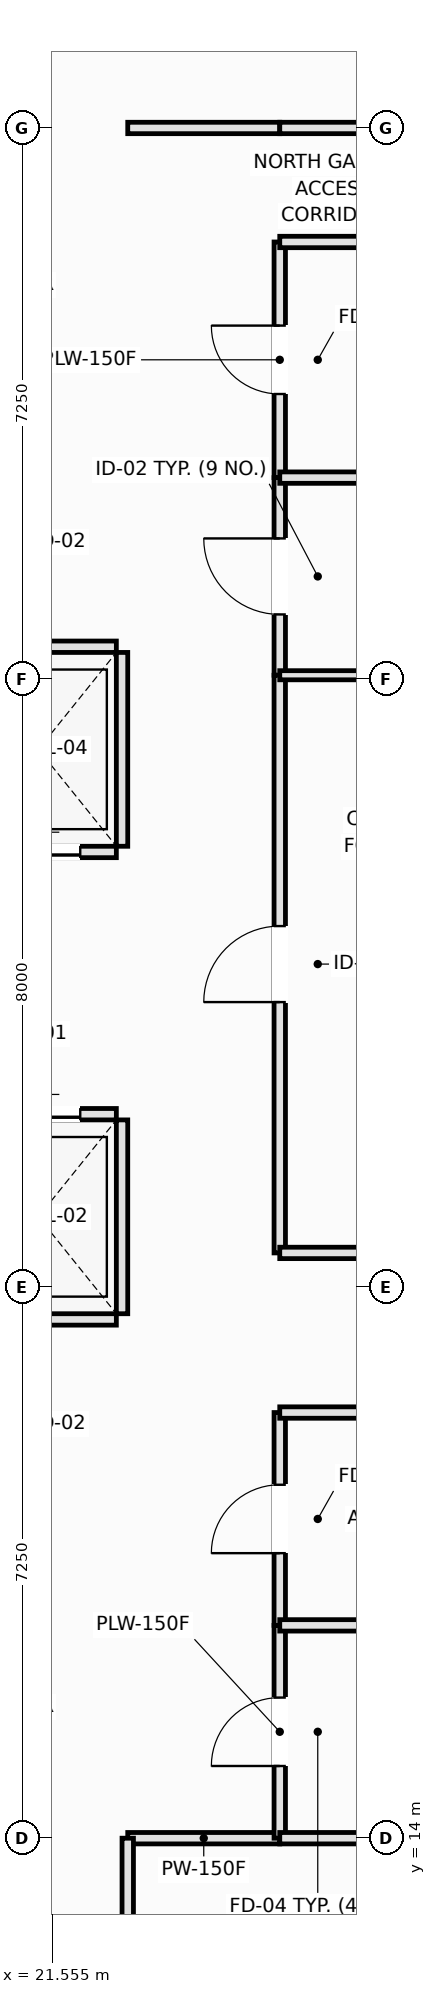
"""IFC4 building model, lengths in metres.
Left out: names, types, materials, properties, quantities, classifications, styles, units other than length and angle.
Written with IfcOpenShell. Run it as: python <this file> out.ifc"""

import sys

from ifc_helpers import new_model, si_unit, direction, frame, frame_2d, origin, place, context, subcontext, project, spatial, rectangle, extrude, element, fill, save


model = new_model("IFC4")
c1 = context("Model", 3, precision=1e-05, world=origin(), true_north=direction((0.0, 1.0)))
c2 = subcontext(c1, "Body", "Model", "MODEL_VIEW")
j1 = project(units=[si_unit("LENGTHUNIT", "METRE"), si_unit("PLANEANGLEUNIT", "RADIAN")], contexts=[c1])
p1 = place(None, origin())
s1 = spatial("IfcSite", under=j1, at=p1, CompositionType="ELEMENT")
p2 = place(p1, origin())
s2 = spatial("IfcBuilding", under=s1, at=p2, CompositionType="ELEMENT")
p3 = place(p2, frame((0.0, 0.0, 10.8)))
s3 = spatial("IfcBuildingStorey", under=s2, at=p3, CompositionType="ELEMENT", Elevation=10.8)
p4 = place(p3, frame((20.35, 20.825, 0.0), z_axis=(0.0, 0.0, 1.0), x_axis=(1.0, 0.0, 0.0)))
e1 = element("IfcWall", 1, at=p4, inside=s3, PredefinedType="PARTITIONING", context=c2, shape_type="SweptSolid", body=[
    extrude(rectangle(XDim=2.05, YDim=0.15, at=frame_2d((1.025, 0.0))), origin(), (0.0, 0.0, 1.0), 4.6),
])
p5 = place(p3, frame((20.35, 23.525, 0.0), z_axis=(0.0, 0.0, 1.0), x_axis=(1.0, 0.0, 0.0)))
e2 = element("IfcWall", 2, at=p5, inside=s3, PredefinedType="PARTITIONING", context=c2, shape_type="SweptSolid", body=[
    extrude(rectangle(XDim=2.05, YDim=0.15, at=frame_2d((1.025, 0.0))), origin(), (0.0, 0.0, 1.0), 4.6),
])
p6 = place(p5, frame((0.475, 0.0, 0.0)))
e3 = element("IfcOpeningElement", 3, at=p6, cuts=e2, PredefinedType="OPENING", context=c2, shape_type="SweptSolid", body=[
    extrude(rectangle(XDim=1.1, YDim=2.2, at=frame_2d((0.55, 1.1))), frame((0.0, 0.085, 0.0), z_axis=(0.0, -1.0, 0.0), x_axis=(1.0, 0.0, 0.0)), (0.0, 0.0, 1.0), 0.17),
])
p7 = place(p3, frame((22.475, 20.9, 0.0), z_axis=(0.0, 0.0, 1.0), x_axis=(0.0, 1.0, 0.0)))
e4 = element("IfcWall", 4, at=p7, inside=s3, PredefinedType="PARTITIONING", context=c2, shape_type="SweptSolid", body=[
    extrude(rectangle(XDim=2.55, YDim=0.15, at=frame_2d((1.275, 0.0))), origin(), (0.0, 0.0, 1.0), 4.6),
])
p8 = place(p3, frame((20.35, 26.975, 0.0), z_axis=(0.0, 0.0, 1.0), x_axis=(1.0, 0.0, 0.0)))
e5 = element("IfcWall", 5, at=p8, inside=s3, PredefinedType="PARTITIONING", context=c2, shape_type="SweptSolid", body=[
    extrude(rectangle(XDim=2.05, YDim=0.15, at=frame_2d((1.025, 0.0))), origin(), (0.0, 0.0, 1.0), 4.6),
])
p9 = place(p8, frame((0.475, 0.0, 0.0)))
e6 = element("IfcOpeningElement", 6, at=p9, cuts=e5, PredefinedType="OPENING", context=c2, shape_type="SweptSolid", body=[
    extrude(rectangle(XDim=1.1, YDim=2.2, at=frame_2d((0.55, 1.1))), frame((0.0, 0.085, 0.0), z_axis=(0.0, -1.0, 0.0), x_axis=(1.0, 0.0, 0.0)), (0.0, 0.0, 1.0), 0.17),
])
p10 = place(p3, frame((20.35, 29.675, 0.0), z_axis=(0.0, 0.0, 1.0), x_axis=(1.0, 0.0, 0.0)))
e7 = element("IfcWall", 7, at=p10, inside=s3, PredefinedType="PARTITIONING", context=c2, shape_type="SweptSolid", body=[
    extrude(rectangle(XDim=2.05, YDim=0.15, at=frame_2d((1.025, 0.0))), origin(), (0.0, 0.0, 1.0), 4.6),
])
p11 = place(p3, frame((22.475, 27.05, 0.0), z_axis=(0.0, 0.0, 1.0), x_axis=(0.0, 1.0, 0.0)))
e8 = element("IfcWall", 8, at=p11, inside=s3, PredefinedType="PARTITIONING", context=c2, shape_type="SweptSolid", body=[
    extrude(rectangle(XDim=2.55, YDim=0.15, at=frame_2d((1.275, 0.0))), origin(), (0.0, 0.0, 1.0), 4.6),
])
for number, where, z_axis, x_axis in (
    (9, (22.55, 14.0, 0.0), (0.0, 0.0, 1.0), (1.0, 0.0, 0.0)),
    (10, (22.55, 36.5, 0.0), (0.0, 0.0, 1.0), (1.0, 0.0, 0.0)),
):
    element("IfcWall", number, at=place(p3, frame(where, z_axis=z_axis, x_axis=x_axis)), inside=s3, PredefinedType="PARTITIONING", context=c2, shape_type="SweptSolid", body=[
        extrude(rectangle(XDim=2.0, YDim=0.15, at=frame_2d((1.0, 0.0))), origin(), (0.0, 0.0, 1.0), 4.6),
    ])
p12 = place(p3, frame((24.55, 14.0, 0.0), z_axis=(0.0, 0.0, 1.0), x_axis=(0.0, 1.0, 0.0)))
e11 = element("IfcWall", 11, at=p12, inside=s3, PredefinedType="PLUMBINGWALL", context=c2, shape_type="SweptSolid", body=[
    extrude(rectangle(XDim=2.8, YDim=0.15, at=frame_2d((1.4, 0.0))), origin(), (0.0, 0.0, 1.0), 4.6),
])
p13 = place(p12, frame((0.95, 0.0, 0.0)))
e12 = element("IfcOpeningElement", 12, at=p13, cuts=e11, PredefinedType="OPENING", context=c2, shape_type="SweptSolid", body=[
    extrude(rectangle(XDim=0.9, YDim=2.1, at=frame_2d((0.45, 1.05))), frame((0.0, 0.085, 0.0), z_axis=(0.0, -1.0, 0.0), x_axis=(1.0, 0.0, 0.0)), (0.0, 0.0, 1.0), 0.17),
])
p14 = place(p3, frame((24.55, 31.9, 0.0), z_axis=(0.0, 0.0, 1.0), x_axis=(0.0, 1.0, 0.0)))
e13 = element("IfcWall", 13, at=p14, inside=s3, PredefinedType="PLUMBINGWALL", context=c2, shape_type="SweptSolid", body=[
    extrude(rectangle(XDim=3.1, YDim=0.15, at=frame_2d((1.55, 0.0))), origin(), (0.0, 0.0, 1.0), 4.6),
])
p15 = place(p14, frame((1.1, 0.0, 0.0)))
e14 = element("IfcOpeningElement", 14, at=p15, cuts=e13, PredefinedType="OPENING", context=c2, shape_type="SweptSolid", body=[
    extrude(rectangle(XDim=0.9, YDim=2.1, at=frame_2d((0.45, 1.05))), frame((0.0, 0.085, 0.0), z_axis=(0.0, -1.0, 0.0), x_axis=(1.0, 0.0, 0.0)), (0.0, 0.0, 1.0), 0.17),
])
p16 = place(p3, frame((24.55, 16.8, 0.0), z_axis=(0.0, 0.0, 1.0), x_axis=(0.0, 1.0, 0.0)))
e15 = element("IfcWall", 15, at=p16, inside=s3, PredefinedType="PLUMBINGWALL", context=c2, shape_type="SweptSolid", body=[
    extrude(rectangle(XDim=2.8, YDim=0.15, at=frame_2d((1.4, 0.0))), origin(), (0.0, 0.0, 1.0), 4.6),
])
p17 = place(p16, frame((0.95, 0.0, 0.0)))
e16 = element("IfcOpeningElement", 16, at=p17, cuts=e15, PredefinedType="OPENING", context=c2, shape_type="SweptSolid", body=[
    extrude(rectangle(XDim=0.9, YDim=2.1, at=frame_2d((0.45, 1.05))), frame((0.0, 0.085, 0.0), z_axis=(0.0, -1.0, 0.0), x_axis=(1.0, 0.0, 0.0)), (0.0, 0.0, 1.0), 0.17),
])
p18 = place(p3, frame((24.55, 29.3, 0.0), z_axis=(0.0, 0.0, 1.0), x_axis=(0.0, 1.0, 0.0)))
e17 = element("IfcWall", 17, at=p18, inside=s3, PredefinedType="PARTITIONING", context=c2, shape_type="SweptSolid", body=[
    extrude(rectangle(XDim=2.6, YDim=0.15, at=frame_2d((1.3, 0.0))), origin(), (0.0, 0.0, 1.0), 4.6),
])
p19 = place(p18, frame((0.8, 0.0, 0.0)))
e18 = element("IfcOpeningElement", 18, at=p19, cuts=e17, PredefinedType="OPENING", context=c2, shape_type="SweptSolid", body=[
    extrude(rectangle(XDim=1.0, YDim=2.15, at=frame_2d((0.5, 1.075))), frame((0.0, 0.085, 0.0), z_axis=(0.0, -1.0, 0.0), x_axis=(1.0, 0.0, 0.0)), (0.0, 0.0, 1.0), 0.17),
])
p20 = place(p3, frame((24.55, 21.7, 0.0), z_axis=(0.0, 0.0, 1.0), x_axis=(0.0, 1.0, 0.0)))
e19 = element("IfcWall", 19, at=p20, inside=s3, PredefinedType="PARTITIONING", context=c2, shape_type="SweptSolid", body=[
    extrude(rectangle(XDim=7.6, YDim=0.15, at=frame_2d((3.8, 0.0))), origin(), (0.0, 0.0, 1.0), 4.6),
])
p21 = place(p20, frame((3.3, 0.0, 0.0)))
e20 = element("IfcOpeningElement", 20, at=p21, cuts=e19, PredefinedType="OPENING", context=c2, shape_type="SweptSolid", body=[
    extrude(rectangle(XDim=1.0, YDim=2.15, at=frame_2d((0.5, 1.075))), frame((0.0, 0.085, 0.0), z_axis=(0.0, -1.0, 0.0), x_axis=(1.0, 0.0, 0.0)), (0.0, 0.0, 1.0), 0.17),
])
p22 = place(p3, frame((24.55, 36.5, 0.0), z_axis=(0.0, 0.0, 1.0), x_axis=(1.0, 0.0, 0.0)))
e21 = element("IfcWall", 21, at=p22, inside=s3, PredefinedType="PARTITIONING", context=c2, shape_type="SweptSolid", body=[
    extrude(rectangle(XDim=3.85, YDim=0.15, at=frame_2d((1.925, 0.0))), origin(), (0.0, 0.0, 1.0), 4.6),
])
p23 = place(p22, frame((2.626, 0.0, 0.0)))
e22 = element("IfcOpeningElement", 22, at=p23, cuts=e21, PredefinedType="OPENING", context=c2, shape_type="SweptSolid", body=[
    extrude(rectangle(XDim=0.9, YDim=2.1, at=frame_2d((0.45, 1.05))), frame((0.0, 0.085, 0.0), z_axis=(0.0, -1.0, 0.0), x_axis=(1.0, 0.0, 0.0)), (0.0, 0.0, 1.0), 0.17),
])
p24 = place(p3, frame((24.55, 35.0, 0.0), z_axis=(0.0, 0.0, 1.0), x_axis=(1.0, 0.0, 0.0)))
e23 = element("IfcWall", 23, at=p24, inside=s3, PredefinedType="PLUMBINGWALL", context=c2, shape_type="SweptSolid", body=[
    extrude(rectangle(XDim=3.85, YDim=0.15, at=frame_2d((1.925, 0.0))), origin(), (0.0, 0.0, 1.0), 4.6),
])
p25 = place(p3, frame((22.55, 11.75, 0.0), z_axis=(0.0, 0.0, 1.0), x_axis=(0.0, 1.0, 0.0)))
e24 = element("IfcWall", 24, at=p25, inside=s3, PredefinedType="PARTITIONING", context=c2, shape_type="SweptSolid", body=[
    extrude(rectangle(XDim=2.25, YDim=0.15, at=frame_2d((1.125, 0.0))), origin(), (0.0, 0.0, 1.0), 4.6),
])
p26 = place(p3, frame((24.55, 19.6, 0.0), z_axis=(0.0, 0.0, 1.0), x_axis=(1.0, 0.0, 0.0)))
e25 = element("IfcWall", 25, at=p26, inside=s3, PredefinedType="PLUMBINGWALL", context=c2, shape_type="SweptSolid", body=[
    extrude(rectangle(XDim=3.85, YDim=0.15, at=frame_2d((1.925, 0.0))), origin(), (0.0, 0.0, 1.0), 4.6),
])
p27 = place(p3, frame((24.55, 21.7, 0.0), z_axis=(0.0, 0.0, 1.0), x_axis=(1.0, 0.0, 0.0)))
e26 = element("IfcWall", 26, at=p27, inside=s3, PredefinedType="PARTITIONING", context=c2, shape_type="SweptSolid", body=[
    extrude(rectangle(XDim=3.85, YDim=0.15, at=frame_2d((1.925, 0.0))), origin(), (0.0, 0.0, 1.0), 4.6),
])
for number, where, z_axis, x_axis in (
    (27, (24.55, 14.0, 0.0), (0.0, 0.0, 1.0), (1.0, 0.0, 0.0)),
    (28, (24.55, 16.8, 0.0), (0.0, 0.0, 1.0), (1.0, 0.0, 0.0)),
):
    element("IfcWall", number, at=place(p3, frame(where, z_axis=z_axis, x_axis=x_axis)), inside=s3, PredefinedType="PLUMBINGWALL", context=c2, shape_type="SweptSolid", body=[
        extrude(rectangle(XDim=3.85, YDim=0.15, at=frame_2d((1.925, 0.0))), origin(), (0.0, 0.0, 1.0), 4.6),
    ])
p28 = place(p3, frame((24.55, 31.9, 0.0), z_axis=(0.0, 0.0, 1.0), x_axis=(1.0, 0.0, 0.0)))
e29 = element("IfcWall", 29, at=p28, inside=s3, PredefinedType="PLUMBINGWALL", context=c2, shape_type="SweptSolid", body=[
    extrude(rectangle(XDim=3.85, YDim=0.15, at=frame_2d((1.925, 0.0))), origin(), (0.0, 0.0, 1.0), 3.8),
])
p29 = place(p3, frame((24.55, 29.3, 0.0), z_axis=(0.0, 0.0, 1.0), x_axis=(1.0, 0.0, 0.0)))
e30 = element("IfcWall", 30, at=p29, inside=s3, PredefinedType="PARTITIONING", context=c2, shape_type="SweptSolid", body=[
    extrude(rectangle(XDim=3.85, YDim=0.12, at=frame_2d((1.925, 0.0))), origin(), (0.0, 0.0, 1.0), 4.6),
])
p30 = place(p6, origin())
e31 = element("IfcDoor", 31, at=p30, inside=s3, OperationType="DOUBLE_DOOR_SLIDING", PredefinedType="DOOR", context=c2, shape_type="SweptSolid", body=[
    extrude(rectangle(XDim=1.1, YDim=2.2, at=frame_2d((0.55, 1.1))), frame((0.0, 0.025, 0.0), z_axis=(0.0, -1.0, 0.0), x_axis=(1.0, 0.0, 0.0)), (0.0, 0.0, 1.0), 0.05),
])
fill(e3, e31)
p31 = place(p9, origin())
e32 = element("IfcDoor", 32, at=p31, inside=s3, OperationType="DOUBLE_DOOR_SLIDING", PredefinedType="DOOR", context=c2, shape_type="SweptSolid", body=[
    extrude(rectangle(XDim=1.1, YDim=2.2, at=frame_2d((0.55, 1.1))), frame((0.0, 0.025, 0.0), z_axis=(0.0, -1.0, 0.0), x_axis=(1.0, 0.0, 0.0)), (0.0, 0.0, 1.0), 0.05),
])
fill(e6, e32)
p32 = place(p13, origin())
e33 = element("IfcDoor", 33, at=p32, inside=s3, OperationType="SINGLE_SWING_LEFT", PredefinedType="DOOR", context=c2, shape_type="SweptSolid", body=[
    extrude(rectangle(XDim=0.9, YDim=2.1, at=frame_2d((0.45, 1.05))), frame((0.0, 0.025, 0.0), z_axis=(0.0, -1.0, 0.0), x_axis=(1.0, 0.0, 0.0)), (0.0, 0.0, 1.0), 0.05),
])
fill(e12, e33)
p33 = place(p15, origin())
e34 = element("IfcDoor", 34, at=p33, inside=s3, OperationType="SINGLE_SWING_RIGHT", PredefinedType="DOOR", context=c2, shape_type="SweptSolid", body=[
    extrude(rectangle(XDim=0.9, YDim=2.1, at=frame_2d((0.45, 1.05))), frame((0.0, 0.025, 0.0), z_axis=(0.0, -1.0, 0.0), x_axis=(1.0, 0.0, 0.0)), (0.0, 0.0, 1.0), 0.05),
])
fill(e14, e34)
p34 = place(p17, origin())
e35 = element("IfcDoor", 35, at=p34, inside=s3, OperationType="SINGLE_SWING_LEFT", PredefinedType="DOOR", context=c2, shape_type="SweptSolid", body=[
    extrude(rectangle(XDim=0.9, YDim=2.1, at=frame_2d((0.45, 1.05))), frame((0.0, 0.025, 0.0), z_axis=(0.0, -1.0, 0.0), x_axis=(1.0, 0.0, 0.0)), (0.0, 0.0, 1.0), 0.05),
])
fill(e16, e35)
p35 = place(p19, origin())
e36 = element("IfcDoor", 36, at=p35, inside=s3, OperationType="SINGLE_SWING_RIGHT", PredefinedType="DOOR", context=c2, shape_type="SweptSolid", body=[
    extrude(rectangle(XDim=1.0, YDim=2.15, at=frame_2d((0.5, 1.075))), frame((0.0, 0.025, 0.0), z_axis=(0.0, -1.0, 0.0), x_axis=(1.0, 0.0, 0.0)), (0.0, 0.0, 1.0), 0.05),
])
fill(e18, e36)
p36 = place(p21, origin())
e37 = element("IfcDoor", 37, at=p36, inside=s3, OperationType="SINGLE_SWING_LEFT", PredefinedType="DOOR", context=c2, shape_type="SweptSolid", body=[
    extrude(rectangle(XDim=1.0, YDim=2.15, at=frame_2d((0.5, 1.075))), frame((0.0, 0.025, 0.0), z_axis=(0.0, -1.0, 0.0), x_axis=(1.0, 0.0, 0.0)), (0.0, 0.0, 1.0), 0.05),
])
fill(e20, e37)
save(model, sys.argv[1])
